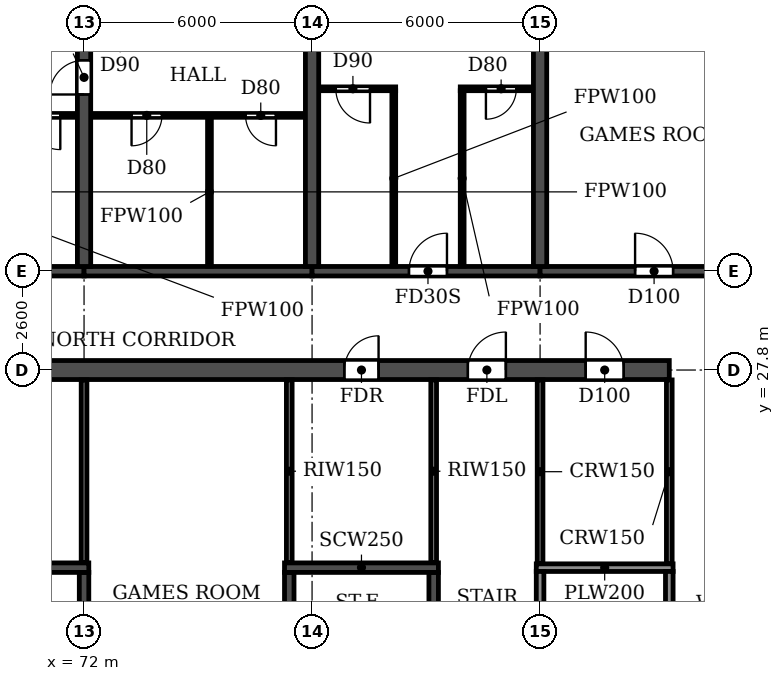
"""IFC4 building model, lengths in metres.
Left out: names, types, materials, properties, quantities, classifications, styles, units other than length and angle.
Written with IfcOpenShell. Run it as: python <this file> out.ifc"""

import sys

from ifc_helpers import new_model, si_unit, direction, frame, frame_2d, origin, place, context, subcontext, project, spatial, rectangle, extrude, element, fill, save


model = new_model("IFC4")
c1 = context("Model", 3, precision=1e-05, world=origin(), true_north=direction((0.0, 1.0)))
c2 = subcontext(c1, "Body", "Model", "MODEL_VIEW")
j1 = project(units=[si_unit("LENGTHUNIT", "METRE"), si_unit("PLANEANGLEUNIT", "RADIAN")], contexts=[c1])
p1 = place(None, origin())
s1 = spatial("IfcSite", under=j1, at=p1, CompositionType="ELEMENT")
p2 = place(p1, origin())
s2 = spatial("IfcBuilding", under=s1, at=p2, CompositionType="ELEMENT")
p3 = place(p2, frame((0.0, 0.0, 109.2)))
s3 = spatial("IfcBuildingStorey", under=s2, at=p3, CompositionType="ELEMENT", Elevation=109.2)
p4 = place(p3, frame((72.0, 30.525, 0.0), z_axis=(0.0, 0.0, 1.0), x_axis=(0.0, 1.0, 0.0)))
e1 = element("IfcWall", 1, at=p4, inside=s3, PredefinedType="SHEAR", context=c2, shape_type="SweptSolid", body=[
    extrude(rectangle(XDim=12.875, YDim=0.35, at=frame_2d((6.438, 0.0))), origin(), (0.0, 0.0, 1.0), 3.06),
])
p5 = place(p4, frame((4.525, 0.0, 0.0)))
e2 = element("IfcOpeningElement", 2, at=p5, cuts=e1, PredefinedType="OPENING", context=c2, shape_type="SweptSolid", body=[
    extrude(rectangle(XDim=0.9, YDim=2.1, at=frame_2d((0.45, 1.05))), frame((0.0, 0.185, 0.0), z_axis=(0.0, -1.0, 0.0), x_axis=(1.0, 0.0, 0.0)), (0.0, 0.0, 1.0), 0.37),
])
for number, where, z_axis, x_axis in (
    (3, (78.0, 30.525, 0.0), (0.0, 0.0, 1.0), (0.0, 1.0, 0.0)),
    (4, (84.0, 30.525, 0.0), (0.0, 0.0, 1.0), (0.0, 1.0, 0.0)),
):
    element("IfcWall", number, at=place(p3, frame(where, z_axis=z_axis, x_axis=x_axis)), inside=s3, PredefinedType="SHEAR", context=c2, shape_type="SweptSolid", body=[
        extrude(rectangle(XDim=12.875, YDim=0.35, at=frame_2d((6.438, 0.0))), origin(), (0.0, 0.0, 1.0), 3.06),
    ])
p6 = place(p3, frame((66.0, 30.4, 0.0), z_axis=(0.0, 0.0, 1.0), x_axis=(1.0, 0.0, 0.0)))
e5 = element("IfcWall", 5, at=p6, inside=s3, PredefinedType="SHEAR", context=c2, shape_type="SweptSolid", body=[
    extrude(rectangle(XDim=6.0, YDim=0.25, at=frame_2d((3.0, 0.0))), origin(), (0.0, 0.0, 1.0), 2.46),
])
p7 = place(p6, frame((2.45, 0.0, 0.0)))
e6 = element("IfcOpeningElement", 6, at=p7, cuts=e5, PredefinedType="OPENING", context=c2, shape_type="SweptSolid", body=[
    extrude(rectangle(XDim=1.0, YDim=2.1, at=frame_2d((0.5, 1.05))), frame((0.0, 0.135, 0.0), z_axis=(0.0, -1.0, 0.0), x_axis=(1.0, 0.0, 0.0)), (0.0, 0.0, 1.0), 0.27),
])
p8 = place(p3, frame((72.0, 30.4, 0.0), z_axis=(0.0, 0.0, 1.0), x_axis=(1.0, 0.0, 0.0)))
e7 = element("IfcWall", 7, at=p8, inside=s3, PredefinedType="SHEAR", context=c2, shape_type="SweptSolid", body=[
    extrude(rectangle(XDim=6.0, YDim=0.25, at=frame_2d((3.0, 0.0))), origin(), (0.0, 0.0, 1.0), 2.46),
])
p9 = place(p3, frame((78.0, 30.4, 0.0), z_axis=(0.0, 0.0, 1.0), x_axis=(1.0, 0.0, 0.0)))
e8 = element("IfcWall", 8, at=p9, inside=s3, PredefinedType="SHEAR", context=c2, shape_type="SweptSolid", body=[
    extrude(rectangle(XDim=6.0, YDim=0.25, at=frame_2d((3.0, 0.0))), origin(), (0.0, 0.0, 1.0), 2.46),
])
p10 = place(p9, frame((2.55, 0.0, 0.0)))
e9 = element("IfcOpeningElement", 9, at=p10, cuts=e8, PredefinedType="OPENING", context=c2, shape_type="SweptSolid", body=[
    extrude(rectangle(XDim=1.0, YDim=2.1, at=frame_2d((0.5, 1.05))), frame((0.0, 0.135, 0.0), z_axis=(0.0, -1.0, 0.0), x_axis=(1.0, 0.0, 0.0)), (0.0, 0.0, 1.0), 0.27),
])
p11 = place(p3, frame((84.0, 30.4, 0.0), z_axis=(0.0, 0.0, 1.0), x_axis=(1.0, 0.0, 0.0)))
e10 = element("IfcWall", 10, at=p11, inside=s3, PredefinedType="SHEAR", context=c2, shape_type="SweptSolid", body=[
    extrude(rectangle(XDim=5.8, YDim=0.25, at=frame_2d((2.9, 0.0))), origin(), (0.0, 0.0, 1.0), 2.46),
])
p12 = place(p11, frame((2.5, 0.0, 0.0)))
e11 = element("IfcOpeningElement", 11, at=p12, cuts=e10, PredefinedType="OPENING", context=c2, shape_type="SweptSolid", body=[
    extrude(rectangle(XDim=1.0, YDim=2.1, at=frame_2d((0.5, 1.05))), frame((0.0, 0.135, 0.0), z_axis=(0.0, -1.0, 0.0), x_axis=(1.0, 0.0, 0.0)), (0.0, 0.0, 1.0), 0.27),
])
p13 = place(p3, frame((14.6, 27.8, 0.0), z_axis=(0.0, 0.0, 1.0), x_axis=(1.0, 0.0, 0.0)))
e12 = element("IfcWall", 12, at=p13, inside=s3, PredefinedType="SOLIDWALL", context=c2, shape_type="SweptSolid", body=[
    extrude(rectangle(XDim=72.8, YDim=0.5, at=frame_2d((36.4, 0.0))), origin(), (0.0, 0.0, 1.0), 3.06),
])
p14 = place(p13, frame((1.2, 0.0, 0.0)))
e13 = element("IfcOpeningElement", 13, at=p14, cuts=e12, PredefinedType="OPENING", context=c2, shape_type="SweptSolid", body=[
    extrude(rectangle(XDim=1.0, YDim=2.1, at=frame_2d((0.5, 1.05))), frame((0.0, 0.26, 0.0), z_axis=(0.0, -1.0, 0.0), x_axis=(1.0, 0.0, 0.0)), (0.0, 0.0, 1.0), 0.52),
])
p15 = place(p13, frame((4.3, 0.0, 0.0)))
e14 = element("IfcOpeningElement", 14, at=p15, cuts=e12, PredefinedType="OPENING", context=c2, shape_type="SweptSolid", body=[
    extrude(rectangle(XDim=1.0, YDim=2.1, at=frame_2d((0.5, 1.05))), frame((0.0, 0.26, 0.0), z_axis=(0.0, -1.0, 0.0), x_axis=(1.0, 0.0, 0.0)), (0.0, 0.0, 1.0), 0.52),
])
p16 = place(p13, frame((7.65, 0.0, 0.0)))
e15 = element("IfcOpeningElement", 15, at=p16, cuts=e12, PredefinedType="OPENING", context=c2, shape_type="SweptSolid", body=[
    extrude(rectangle(XDim=0.9, YDim=2.1, at=frame_2d((0.45, 1.05))), frame((0.0, 0.26, 0.0), z_axis=(0.0, -1.0, 0.0), x_axis=(1.0, 0.0, 0.0)), (0.0, 0.0, 1.0), 0.52),
])
p17 = place(p13, frame((16.85, 0.0, 0.0)))
e16 = element("IfcOpeningElement", 16, at=p17, cuts=e12, PredefinedType="OPENING", context=c2, shape_type="SweptSolid", body=[
    extrude(rectangle(XDim=0.9, YDim=2.1, at=frame_2d((0.45, 1.05))), frame((0.0, 0.26, 0.0), z_axis=(0.0, -1.0, 0.0), x_axis=(1.0, 0.0, 0.0)), (0.0, 0.0, 1.0), 0.52),
])
p18 = place(p13, frame((20.0, 0.0, 0.0)))
e17 = element("IfcOpeningElement", 17, at=p18, cuts=e12, PredefinedType="OPENING", context=c2, shape_type="SweptSolid", body=[
    extrude(rectangle(XDim=1.0, YDim=2.1, at=frame_2d((0.5, 1.05))), frame((0.0, 0.26, 0.0), z_axis=(0.0, -1.0, 0.0), x_axis=(1.0, 0.0, 0.0)), (0.0, 0.0, 1.0), 0.52),
])
p19 = place(p13, frame((25.2, 0.0, 0.0)))
e18 = element("IfcOpeningElement", 18, at=p19, cuts=e12, PredefinedType="OPENING", context=c2, shape_type="SweptSolid", body=[
    extrude(rectangle(XDim=1.0, YDim=2.1, at=frame_2d((0.5, 1.05))), frame((0.0, 0.26, 0.0), z_axis=(0.0, -1.0, 0.0), x_axis=(1.0, 0.0, 0.0)), (0.0, 0.0, 1.0), 0.52),
])
p20 = place(p13, frame((33.0, 0.0, 0.0)))
e19 = element("IfcOpeningElement", 19, at=p20, cuts=e12, PredefinedType="OPENING", context=c2, shape_type="SweptSolid", body=[
    extrude(rectangle(XDim=1.0, YDim=2.1, at=frame_2d((0.5, 1.05))), frame((0.0, 0.26, 0.0), z_axis=(0.0, -1.0, 0.0), x_axis=(1.0, 0.0, 0.0)), (0.0, 0.0, 1.0), 0.52),
])
p21 = place(p13, frame((35.9, 0.0, 0.0)))
e20 = element("IfcOpeningElement", 20, at=p21, cuts=e12, PredefinedType="OPENING", context=c2, shape_type="SweptSolid", body=[
    extrude(rectangle(XDim=1.0, YDim=2.1, at=frame_2d((0.5, 1.05))), frame((0.0, 0.26, 0.0), z_axis=(0.0, -1.0, 0.0), x_axis=(1.0, 0.0, 0.0)), (0.0, 0.0, 1.0), 0.52),
])
p22 = place(p13, frame((38.8, 0.0, 0.0)))
e21 = element("IfcOpeningElement", 21, at=p22, cuts=e12, PredefinedType="OPENING", context=c2, shape_type="SweptSolid", body=[
    extrude(rectangle(XDim=1.0, YDim=2.1, at=frame_2d((0.5, 1.05))), frame((0.0, 0.26, 0.0), z_axis=(0.0, -1.0, 0.0), x_axis=(1.0, 0.0, 0.0)), (0.0, 0.0, 1.0), 0.52),
])
p23 = place(p13, frame((42.7, 0.0, 0.0)))
e22 = element("IfcOpeningElement", 22, at=p23, cuts=e12, PredefinedType="OPENING", context=c2, shape_type="SweptSolid", body=[
    extrude(rectangle(XDim=1.0, YDim=2.1, at=frame_2d((0.5, 1.05))), frame((0.0, 0.26, 0.0), z_axis=(0.0, -1.0, 0.0), x_axis=(1.0, 0.0, 0.0)), (0.0, 0.0, 1.0), 0.52),
])
p24 = place(p13, frame((47.65, 0.0, 0.0)))
e23 = element("IfcOpeningElement", 23, at=p24, cuts=e12, PredefinedType="OPENING", context=c2, shape_type="SweptSolid", body=[
    extrude(rectangle(XDim=1.5, YDim=2.1, at=frame_2d((0.75, 1.05))), frame((0.0, 0.26, 0.0), z_axis=(0.0, -1.0, 0.0), x_axis=(1.0, 0.0, 0.0)), (0.0, 0.0, 1.0), 0.52),
])
p25 = place(p13, frame((51.8, 0.0, 0.0)))
e24 = element("IfcOpeningElement", 24, at=p25, cuts=e12, PredefinedType="OPENING", context=c2, shape_type="SweptSolid", body=[
    extrude(rectangle(XDim=1.0, YDim=2.1, at=frame_2d((0.5, 1.05))), frame((0.0, 0.26, 0.0), z_axis=(0.0, -1.0, 0.0), x_axis=(1.0, 0.0, 0.0)), (0.0, 0.0, 1.0), 0.52),
])
p26 = place(p13, frame((55.05, 0.0, 0.0)))
e25 = element("IfcOpeningElement", 25, at=p26, cuts=e12, PredefinedType="OPENING", context=c2, shape_type="SweptSolid", body=[
    extrude(rectangle(XDim=0.9, YDim=2.1, at=frame_2d((0.45, 1.05))), frame((0.0, 0.26, 0.0), z_axis=(0.0, -1.0, 0.0), x_axis=(1.0, 0.0, 0.0)), (0.0, 0.0, 1.0), 0.52),
])
p27 = place(p13, frame((64.25, 0.0, 0.0)))
e26 = element("IfcOpeningElement", 26, at=p27, cuts=e12, PredefinedType="OPENING", context=c2, shape_type="SweptSolid", body=[
    extrude(rectangle(XDim=0.9, YDim=2.1, at=frame_2d((0.45, 1.05))), frame((0.0, 0.26, 0.0), z_axis=(0.0, -1.0, 0.0), x_axis=(1.0, 0.0, 0.0)), (0.0, 0.0, 1.0), 0.52),
])
p28 = place(p13, frame((67.5, 0.0, 0.0)))
e27 = element("IfcOpeningElement", 27, at=p28, cuts=e12, PredefinedType="OPENING", context=c2, shape_type="SweptSolid", body=[
    extrude(rectangle(XDim=1.0, YDim=2.1, at=frame_2d((0.5, 1.05))), frame((0.0, 0.26, 0.0), z_axis=(0.0, -1.0, 0.0), x_axis=(1.0, 0.0, 0.0)), (0.0, 0.0, 1.0), 0.52),
])
p29 = place(p13, frame((70.6, 0.0, 0.0)))
e28 = element("IfcOpeningElement", 28, at=p29, cuts=e12, PredefinedType="OPENING", context=c2, shape_type="SweptSolid", body=[
    extrude(rectangle(XDim=1.0, YDim=2.1, at=frame_2d((0.5, 1.05))), frame((0.0, 0.26, 0.0), z_axis=(0.0, -1.0, 0.0), x_axis=(1.0, 0.0, 0.0)), (0.0, 0.0, 1.0), 0.52),
])
p30 = place(p3, frame((72.0, 14.85, 0.0), z_axis=(0.0, 0.0, 1.0), x_axis=(0.0, 1.0, 0.0)))
e29 = element("IfcWall", 29, at=p30, inside=s3, PredefinedType="SOLIDWALL", context=c2, shape_type="SweptSolid", body=[
    extrude(rectangle(XDim=7.625, YDim=0.25, at=frame_2d((3.812, 0.0))), origin(), (0.0, 0.0, 1.0), 3.06),
])
p31 = place(p3, frame((68.075, 22.6, 0.0), z_axis=(0.0, 0.0, 1.0), x_axis=(1.0, 0.0, 0.0)))
e30 = element("IfcWall", 30, at=p31, inside=s3, PredefinedType="SOLIDWALL", context=c2, shape_type="SweptSolid", body=[
    extrude(rectangle(XDim=4.05, YDim=0.25, at=frame_2d((2.025, 0.0))), origin(), (0.0, 0.0, 1.0), 3.06),
])
p32 = place(p3, frame((77.4, 14.85, 0.0), z_axis=(0.0, 0.0, 1.0), x_axis=(0.0, 1.0, 0.0)))
e31 = element("IfcWall", 31, at=p32, inside=s3, PredefinedType="SOLIDWALL", context=c2, shape_type="SweptSolid", body=[
    extrude(rectangle(XDim=7.625, YDim=0.25, at=frame_2d((3.812, 0.0))), origin(), (0.0, 0.0, 1.0), 3.06),
])
p33 = place(p3, frame((81.2, 14.85, 0.0), z_axis=(0.0, 0.0, 1.0), x_axis=(0.0, 1.0, 0.0)))
e32 = element("IfcWall", 32, at=p33, inside=s3, PredefinedType="SOLIDWALL", context=c2, shape_type="SweptSolid", body=[
    extrude(rectangle(XDim=7.625, YDim=0.25, at=frame_2d((3.812, 0.0))), origin(), (0.0, 0.0, 1.0), 3.06),
])
p34 = place(p33, frame((0.45, 0.0, 0.0)))
e33 = element("IfcOpeningElement", 33, at=p34, cuts=e32, PredefinedType="OPENING", context=c2, shape_type="SweptSolid", body=[
    extrude(rectangle(XDim=1.0, YDim=2.1, at=frame_2d((0.5, 1.05))), frame((0.0, 0.135, 0.0), z_axis=(0.0, -1.0, 0.0), x_axis=(1.0, 0.0, 0.0)), (0.0, 0.0, 1.0), 0.27),
])
p35 = place(p3, frame((77.275, 22.6, 0.0), z_axis=(0.0, 0.0, 1.0), x_axis=(1.0, 0.0, 0.0)))
e34 = element("IfcWall", 34, at=p35, inside=s3, PredefinedType="SOLIDWALL", context=c2, shape_type="SweptSolid", body=[
    extrude(rectangle(XDim=4.05, YDim=0.25, at=frame_2d((2.025, 0.0))), origin(), (0.0, 0.0, 1.0), 3.06),
])
for number, where, z_axis, x_axis in (
    (35, (84.0, 22.7, 0.0), (0.0, 0.0, 1.0), (0.0, 1.0, 0.0)),
    (36, (87.4, 22.7, 0.0), (0.0, 0.0, 1.0), (0.0, 1.0, 0.0)),
):
    element("IfcWall", number, at=place(p3, frame(where, z_axis=z_axis, x_axis=x_axis)), inside=s3, PredefinedType="PARTITIONING", context=c2, shape_type="SweptSolid", body=[
        extrude(rectangle(XDim=4.84, YDim=0.15, at=frame_2d((2.42, 0.0))), origin(), (0.0, 0.0, 1.0), 3.06),
    ])
p36 = place(p3, frame((69.8, 34.5, 0.0), z_axis=(0.0, 0.0, 1.0), x_axis=(1.0, 0.0, 0.0)))
e37 = element("IfcWall", 37, at=p36, inside=s3, PredefinedType="PARTITIONING", context=c2, shape_type="SweptSolid", body=[
    extrude(rectangle(XDim=2.015, YDim=0.1, at=frame_2d((1.007, 0.0))), origin(), (0.0, 0.0, 1.0), 3.06),
])
p37 = place(p36, frame((0.675, 0.0, 0.0)))
e38 = element("IfcOpeningElement", 38, at=p37, cuts=e37, PredefinedType="OPENING", context=c2, shape_type="SweptSolid", body=[
    extrude(rectangle(XDim=0.9, YDim=2.1, at=frame_2d((0.45, 1.05))), frame((0.0, 0.06, 0.0), z_axis=(0.0, -1.0, 0.0), x_axis=(1.0, 0.0, 0.0)), (0.0, 0.0, 1.0), 0.12),
])
p38 = place(p3, frame((72.185, 34.5, 0.0), z_axis=(0.0, 0.0, 1.0), x_axis=(1.0, 0.0, 0.0)))
e39 = element("IfcWall", 39, at=p38, inside=s3, PredefinedType="PARTITIONING", context=c2, shape_type="SweptSolid", body=[
    extrude(rectangle(XDim=5.63, YDim=0.1, at=frame_2d((2.815, 0.0))), origin(), (0.0, 0.0, 1.0), 3.06),
])
p39 = place(p38, frame((1.065, 0.0, 0.0)))
e40 = element("IfcOpeningElement", 40, at=p39, cuts=e39, PredefinedType="OPENING", context=c2, shape_type="SweptSolid", body=[
    extrude(rectangle(XDim=0.8, YDim=2.1, at=frame_2d((0.4, 1.05))), frame((0.0, 0.06, 0.0), z_axis=(0.0, -1.0, 0.0), x_axis=(1.0, 0.0, 0.0)), (0.0, 0.0, 1.0), 0.12),
])
p40 = place(p38, frame((4.065, 0.0, 0.0)))
e41 = element("IfcOpeningElement", 41, at=p40, cuts=e39, PredefinedType="OPENING", context=c2, shape_type="SweptSolid", body=[
    extrude(rectangle(XDim=0.8, YDim=2.1, at=frame_2d((0.4, 1.05))), frame((0.0, 0.06, 0.0), z_axis=(0.0, -1.0, 0.0), x_axis=(1.0, 0.0, 0.0)), (0.0, 0.0, 1.0), 0.12),
])
p41 = place(p3, frame((78.185, 35.2, 0.0), z_axis=(0.0, 0.0, 1.0), x_axis=(1.0, 0.0, 0.0)))
e42 = element("IfcWall", 42, at=p41, inside=s3, PredefinedType="PARTITIONING", context=c2, shape_type="SweptSolid", body=[
    extrude(rectangle(XDim=2.015, YDim=0.1, at=frame_2d((1.007, 0.0))), origin(), (0.0, 0.0, 1.0), 3.06),
])
p42 = place(p41, frame((0.44, 0.0, 0.0)))
e43 = element("IfcOpeningElement", 43, at=p42, cuts=e42, PredefinedType="OPENING", context=c2, shape_type="SweptSolid", body=[
    extrude(rectangle(XDim=0.9, YDim=2.1, at=frame_2d((0.45, 1.05))), frame((0.0, 0.06, 0.0), z_axis=(0.0, -1.0, 0.0), x_axis=(1.0, 0.0, 0.0)), (0.0, 0.0, 1.0), 0.12),
])
p43 = place(p3, frame((81.9, 35.2, 0.0), z_axis=(0.0, 0.0, 1.0), x_axis=(1.0, 0.0, 0.0)))
e44 = element("IfcWall", 44, at=p43, inside=s3, PredefinedType="PARTITIONING", context=c2, shape_type="SweptSolid", body=[
    extrude(rectangle(XDim=1.915, YDim=0.1, at=frame_2d((0.958, 0.0))), origin(), (0.0, 0.0, 1.0), 3.06),
])
p44 = place(p43, frame((0.675, 0.0, 0.0)))
e45 = element("IfcOpeningElement", 45, at=p44, cuts=e44, PredefinedType="OPENING", context=c2, shape_type="SweptSolid", body=[
    extrude(rectangle(XDim=0.8, YDim=2.1, at=frame_2d((0.4, 1.05))), frame((0.0, 0.06, 0.0), z_axis=(0.0, -1.0, 0.0), x_axis=(1.0, 0.0, 0.0)), (0.0, 0.0, 1.0), 0.12),
])
p45 = place(p3, frame((75.3, 30.535, 0.0), z_axis=(0.0, 0.0, 1.0), x_axis=(0.0, 1.0, 0.0)))
e46 = element("IfcWall", 46, at=p45, inside=s3, PredefinedType="PARTITIONING", context=c2, shape_type="SweptSolid", body=[
    extrude(rectangle(XDim=3.915, YDim=0.1, at=frame_2d((1.958, 0.0))), origin(), (0.0, 0.0, 1.0), 3.06),
])
for number, where, z_axis, x_axis in (
    (47, (80.15, 30.535, 0.0), (0.0, 0.0, 1.0), (0.0, 1.0, 0.0)),
    (48, (81.95, 30.535, 0.0), (0.0, 0.0, 1.0), (0.0, 1.0, 0.0)),
):
    element("IfcWall", number, at=place(p3, frame(where, z_axis=z_axis, x_axis=x_axis)), inside=s3, PredefinedType="PARTITIONING", context=c2, shape_type="SweptSolid", body=[
        extrude(rectangle(XDim=4.615, YDim=0.1, at=frame_2d((2.308, 0.0))), origin(), (0.0, 0.0, 1.0), 3.06),
    ])
p46 = place(p3, frame((83.9, 22.6, 0.0), z_axis=(0.0, 0.0, 1.0), x_axis=(1.0, 0.0, 0.0)))
e49 = element("IfcWall", 49, at=p46, inside=s3, PredefinedType="PARTITIONING", context=c2, shape_type="SweptSolid", body=[
    extrude(rectangle(XDim=3.6, YDim=0.2, at=frame_2d((1.8, 0.0))), origin(), (0.0, 0.0, 1.0), 3.06),
])
for number, where, z_axis, x_axis in (
    (50, (84.0, 14.86, 0.0), (0.0, 0.0, 1.0), (0.0, 1.0, 0.0)),
    (51, (87.4, 14.86, 0.0), (0.0, 0.0, 1.0), (0.0, 1.0, 0.0)),
):
    element("IfcWall", number, at=place(p3, frame(where, z_axis=z_axis, x_axis=x_axis)), inside=s3, PredefinedType="PARTITIONING", context=c2, shape_type="SweptSolid", body=[
        extrude(rectangle(XDim=7.64, YDim=0.2, at=frame_2d((3.82, 0.0))), origin(), (0.0, 0.0, 1.0), 3.06),
    ])
for number, where, z_axis, x_axis in (
    (52, (72.0, 22.735, 0.0), (0.0, 0.0, 1.0), (0.0, 1.0, 0.0)),
    (53, (77.4, 22.735, 0.0), (0.0, 0.0, 1.0), (0.0, 1.0, 0.0)),
    (54, (81.2, 22.735, 0.0), (0.0, 0.0, 1.0), (0.0, 1.0, 0.0)),
):
    element("IfcWall", number, at=place(p3, frame(where, z_axis=z_axis, x_axis=x_axis)), inside=s3, PredefinedType="PARTITIONING", context=c2, shape_type="SweptSolid", body=[
        extrude(rectangle(XDim=4.805, YDim=0.15, at=frame_2d((2.402, 0.0))), origin(), (0.0, 0.0, 1.0), 3.06),
    ])
p47 = place(p27, origin())
e55 = element("IfcDoor", 55, at=p47, inside=s3, OperationType="SINGLE_SWING_RIGHT", PredefinedType="DOOR", context=c2, shape_type="SweptSolid", body=[
    extrude(rectangle(XDim=0.9, YDim=2.1, at=frame_2d((0.45, 1.05))), frame((0.0, 0.025, 0.0), z_axis=(0.0, -1.0, 0.0), x_axis=(1.0, 0.0, 0.0)), (0.0, 0.0, 1.0), 0.05),
])
fill(e26, e55)
p48 = place(p28, origin())
e56 = element("IfcDoor", 56, at=p48, inside=s3, OperationType="SINGLE_SWING_RIGHT", PredefinedType="DOOR", context=c2, shape_type="SweptSolid", body=[
    extrude(rectangle(XDim=1.0, YDim=2.1, at=frame_2d((0.5, 1.05))), frame((0.0, 0.025, 0.0), z_axis=(0.0, -1.0, 0.0), x_axis=(1.0, 0.0, 0.0)), (0.0, 0.0, 1.0), 0.05),
])
fill(e27, e56)
p49 = place(p29, origin())
e57 = element("IfcDoor", 57, at=p49, inside=s3, OperationType="SINGLE_SWING_LEFT", PredefinedType="DOOR", context=c2, shape_type="SweptSolid", body=[
    extrude(rectangle(XDim=1.0, YDim=2.1, at=frame_2d((0.5, 1.05))), frame((0.0, 0.025, 0.0), z_axis=(0.0, -1.0, 0.0), x_axis=(1.0, 0.0, 0.0)), (0.0, 0.0, 1.0), 0.05),
])
fill(e28, e57)
p50 = place(p39, frame((0.8, 0.0, 0.0), z_axis=(0.0, 0.0, 1.0), x_axis=(-1.0, 0.0, 0.0)))
e58 = element("IfcDoor", 58, at=p50, inside=s3, OperationType="SINGLE_SWING_RIGHT", PredefinedType="DOOR", context=c2, shape_type="SweptSolid", body=[
    extrude(rectangle(XDim=0.8, YDim=2.1, at=frame_2d((0.4, 1.05))), frame((0.0, 0.025, 0.0), z_axis=(0.0, -1.0, 0.0), x_axis=(1.0, 0.0, 0.0)), (0.0, 0.0, 1.0), 0.05),
])
fill(e40, e58)
p51 = place(p40, frame((0.8, 0.0, 0.0), z_axis=(0.0, 0.0, 1.0), x_axis=(-1.0, 0.0, 0.0)))
e59 = element("IfcDoor", 59, at=p51, inside=s3, OperationType="SINGLE_SWING_LEFT", PredefinedType="DOOR", context=c2, shape_type="SweptSolid", body=[
    extrude(rectangle(XDim=0.8, YDim=2.1, at=frame_2d((0.4, 1.05))), frame((0.0, 0.025, 0.0), z_axis=(0.0, -1.0, 0.0), x_axis=(1.0, 0.0, 0.0)), (0.0, 0.0, 1.0), 0.05),
])
fill(e41, e59)
p52 = place(p37, frame((0.9, 0.0, 0.0), z_axis=(0.0, 0.0, 1.0), x_axis=(-1.0, 0.0, 0.0)))
e60 = element("IfcDoor", 60, at=p52, inside=s3, OperationType="SINGLE_SWING_LEFT", PredefinedType="DOOR", context=c2, shape_type="SweptSolid", body=[
    extrude(rectangle(XDim=0.9, YDim=2.1, at=frame_2d((0.45, 1.05))), frame((0.0, 0.025, 0.0), z_axis=(0.0, -1.0, 0.0), x_axis=(1.0, 0.0, 0.0)), (0.0, 0.0, 1.0), 0.05),
])
fill(e38, e60)
p53 = place(p5, origin())
e61 = element("IfcDoor", 61, at=p53, inside=s3, OperationType="SINGLE_SWING_LEFT", PredefinedType="DOOR", context=c2, shape_type="SweptSolid", body=[
    extrude(rectangle(XDim=0.9, YDim=2.1, at=frame_2d((0.45, 1.05))), frame((0.0, 0.025, 0.0), z_axis=(0.0, -1.0, 0.0), x_axis=(1.0, 0.0, 0.0)), (0.0, 0.0, 1.0), 0.05),
])
fill(e2, e61)
p54 = place(p42, frame((0.9, 0.0, 0.0), z_axis=(0.0, 0.0, 1.0), x_axis=(-1.0, 0.0, 0.0)))
e62 = element("IfcDoor", 62, at=p54, inside=s3, OperationType="SINGLE_SWING_LEFT", PredefinedType="DOOR", context=c2, shape_type="SweptSolid", body=[
    extrude(rectangle(XDim=0.9, YDim=2.1, at=frame_2d((0.45, 1.05))), frame((0.0, 0.025, 0.0), z_axis=(0.0, -1.0, 0.0), x_axis=(1.0, 0.0, 0.0)), (0.0, 0.0, 1.0), 0.05),
])
fill(e43, e62)
p55 = place(p10, origin())
e63 = element("IfcDoor", 63, at=p55, inside=s3, OperationType="SINGLE_SWING_RIGHT", PredefinedType="DOOR", context=c2, shape_type="SweptSolid", body=[
    extrude(rectangle(XDim=1.0, YDim=2.1, at=frame_2d((0.5, 1.05))), frame((0.0, 0.025, 0.0), z_axis=(0.0, -1.0, 0.0), x_axis=(1.0, 0.0, 0.0)), (0.0, 0.0, 1.0), 0.05),
])
fill(e9, e63)
p56 = place(p44, frame((0.8, 0.0, 0.0), z_axis=(0.0, 0.0, 1.0), x_axis=(-1.0, 0.0, 0.0)))
e64 = element("IfcDoor", 64, at=p56, inside=s3, OperationType="SINGLE_SWING_RIGHT", PredefinedType="DOOR", context=c2, shape_type="SweptSolid", body=[
    extrude(rectangle(XDim=0.8, YDim=2.1, at=frame_2d((0.4, 1.05))), frame((0.0, 0.025, 0.0), z_axis=(0.0, -1.0, 0.0), x_axis=(1.0, 0.0, 0.0)), (0.0, 0.0, 1.0), 0.05),
])
fill(e45, e64)
p57 = place(p12, origin())
e65 = element("IfcDoor", 65, at=p57, inside=s3, OperationType="SINGLE_SWING_LEFT", PredefinedType="DOOR", context=c2, shape_type="SweptSolid", body=[
    extrude(rectangle(XDim=1.0, YDim=2.1, at=frame_2d((0.5, 1.05))), frame((0.0, 0.025, 0.0), z_axis=(0.0, -1.0, 0.0), x_axis=(1.0, 0.0, 0.0)), (0.0, 0.0, 1.0), 0.05),
])
fill(e11, e65)
save(model, sys.argv[1])
